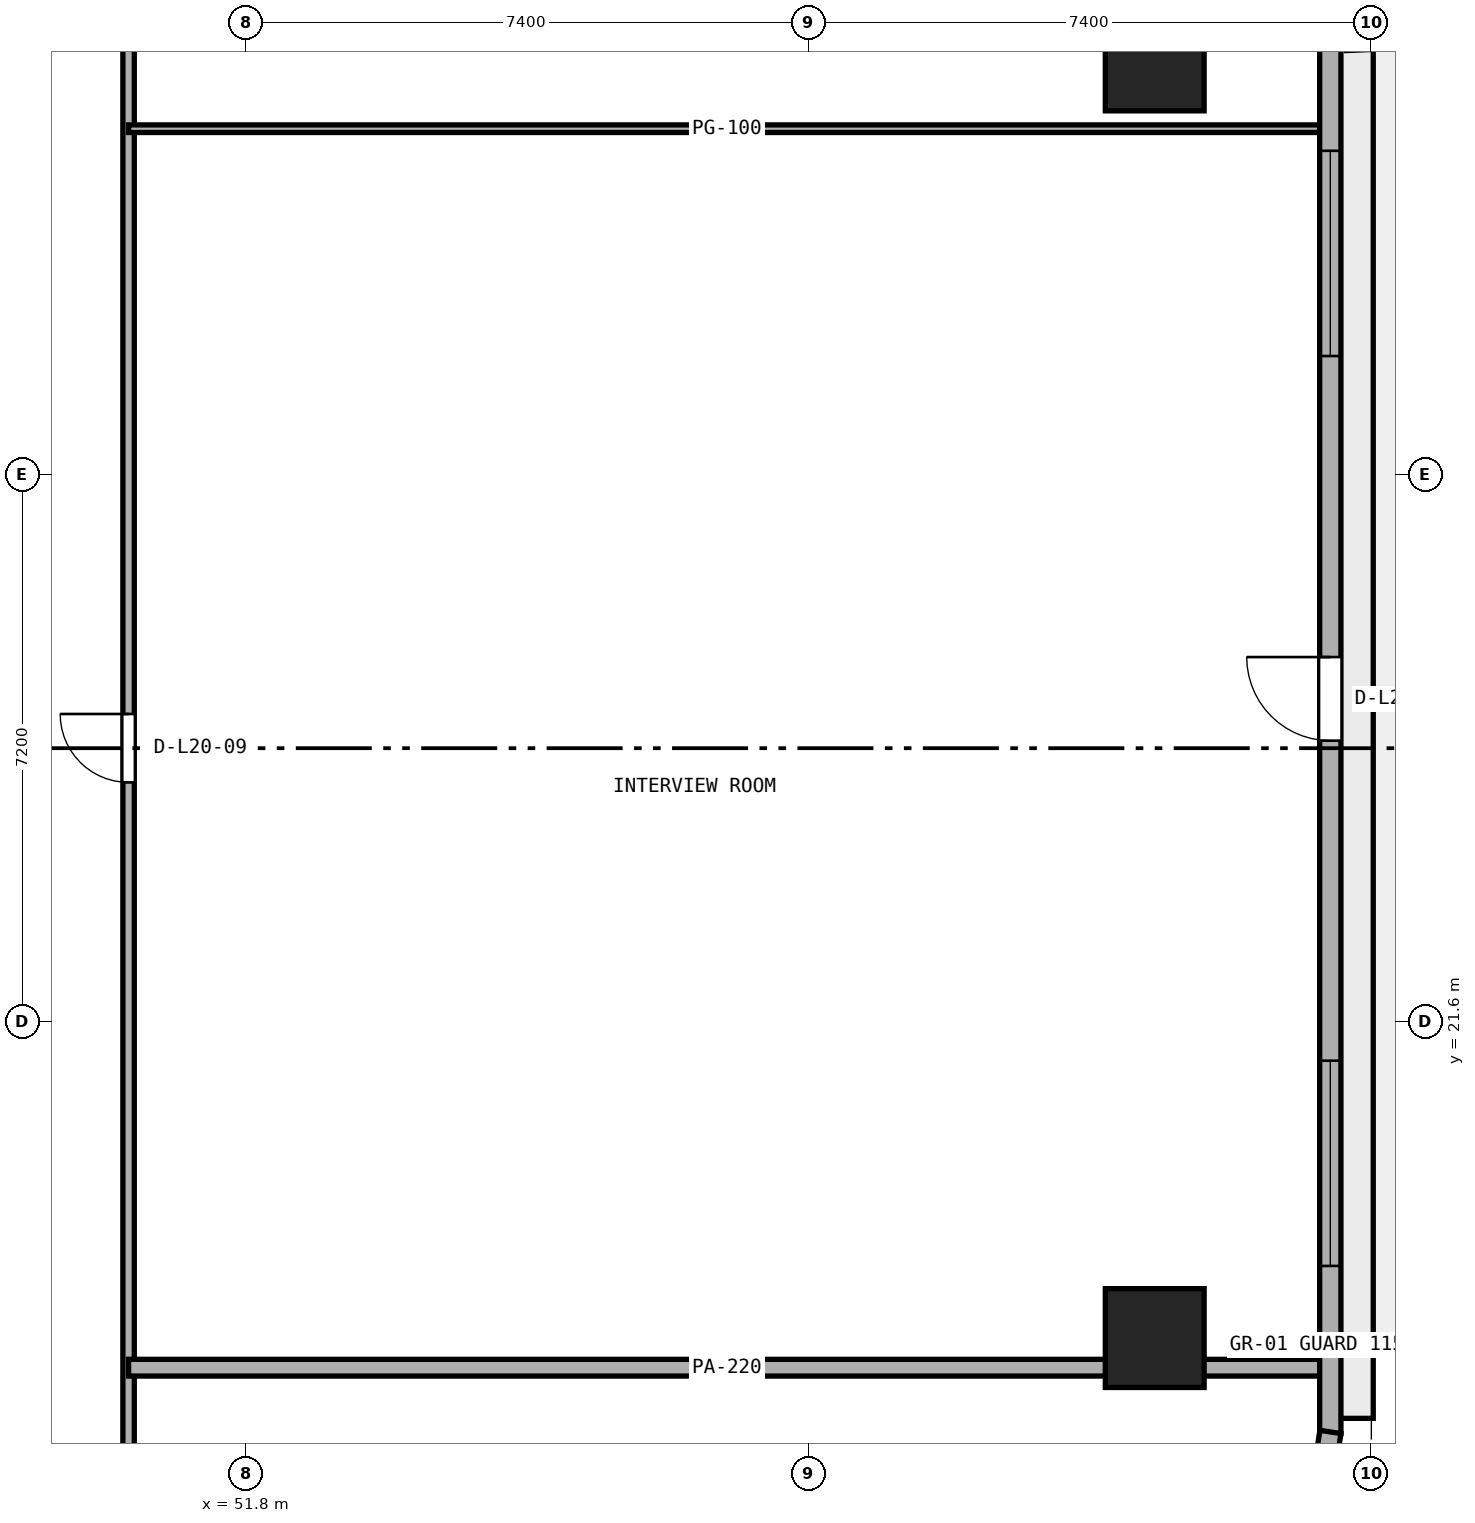
"""IFC4 building model, lengths in metres.
Left out: names, types, materials, properties, quantities, classifications, styles, units other than length and angle.
Written with IfcOpenShell. Run it as: python <this file> out.ifc"""

import sys

from ifc_helpers import new_model, si_unit, direction, frame, frame_2d, origin, origin_2d, place, context, subcontext, project, spatial, rectangle, extrude, element, fill, save


model = new_model("IFC4")
c1 = context("Model", 3, precision=1e-05, world=origin(), true_north=direction((0.0, 1.0)))
c2 = subcontext(c1, "Body", "Model", "MODEL_VIEW")
j1 = project(units=[si_unit("LENGTHUNIT", "METRE"), si_unit("PLANEANGLEUNIT", "RADIAN")], contexts=[c1])
p1 = place(None, origin())
s1 = spatial("IfcSite", under=j1, at=p1, CompositionType="ELEMENT")
p2 = place(p1, origin())
s2 = spatial("IfcBuilding", under=s1, at=p2, CompositionType="ELEMENT")
p3 = place(p2, frame((0.0, 0.0, 82.0)))
s3 = spatial("IfcBuildingStorey", under=s2, at=p3, CompositionType="ELEMENT", Elevation=82.0)
for number, where, z_axis, x_axis in (
    (1, (63.75, 17.44, 0.0), (0.0, 0.0, 1.0), (1.0, 0.0, 0.0)),
    (2, (63.75, 34.235, 0.0), (0.0, 0.0, 1.0), (1.0, 0.0, 0.0)),
):
    element("IfcColumn", number, at=place(p3, frame(where, z_axis=z_axis, x_axis=x_axis)), inside=s3, PredefinedType="COLUMN", context=c2, shape_type="SweptSolid", body=[
        extrude(rectangle(XDim=1.3, YDim=1.3, at=origin_2d()), origin(), (0.0, 0.0, 1.0), 3.8),
    ])
p4 = place(p3, frame((50.25, 15.35, 0.0), z_axis=(0.0, 0.0, 1.0), x_axis=(0.0, 1.0, 0.0)))
e3 = element("IfcWall", 3, at=p4, inside=s3, PredefinedType="PARTITIONING", context=c2, shape_type="SweptSolid", body=[
    extrude(rectangle(XDim=19.7, YDim=0.15, at=frame_2d((9.85, 0.0))), origin(), (0.0, 0.0, 1.0), 3.525),
])
p5 = place(p4, frame((9.4, 0.0, 0.0)))
e4 = element("IfcOpeningElement", 4, at=p5, cuts=e3, PredefinedType="OPENING", context=c2, shape_type="SweptSolid", body=[
    extrude(rectangle(XDim=0.9, YDim=2.1, at=frame_2d((0.45, 1.05))), frame((0.0, 0.085, 0.0), z_axis=(0.0, -1.0, 0.0), x_axis=(1.0, 0.0, 0.0)), (0.0, 0.0, 1.0), 0.17),
])
p6 = place(p3, frame((50.25, 17.05, 0.0), z_axis=(0.0, 0.0, 1.0), x_axis=(1.0, 0.0, 0.0)))
e5 = element("IfcWall", 5, at=p6, inside=s3, PredefinedType="PARTITIONING", context=c2, shape_type="SweptSolid", body=[
    extrude(rectangle(XDim=15.745, YDim=0.22, at=frame_2d((7.873, 0.0))), origin(), (0.0, 0.0, 1.0), 3.525),
])
p7 = place(p3, frame((50.25, 33.35, 0.0), z_axis=(0.0, 0.0, 1.0), x_axis=(1.0, 0.0, 0.0)))
e6 = element("IfcWall", 6, at=p7, inside=s3, PredefinedType="PARTITIONING", context=c2, shape_type="SweptSolid", body=[
    extrude(rectangle(XDim=15.745, YDim=0.1, at=frame_2d((7.873, 0.0))), origin(), (0.0, 0.0, 1.0), 2.908),
])
p8 = place(p3, frame((66.06, 16.183, 0.0), z_axis=(0.0, 0.0, 1.0), x_axis=(0.0, 1.0, 0.0)))
e7 = element("IfcWall", 7, at=p8, inside=s3, PredefinedType="STANDARD", context=c2, shape_type="SweptSolid", body=[
    extrude(rectangle(XDim=19.331, YDim=0.28, at=frame_2d((9.666, 0.0))), origin(), (0.0, 0.0, 1.0), 3.525),
])
p9 = place(p8, frame((9.115, 0.0, 0.0)))
e8 = element("IfcOpeningElement", 8, at=p9, cuts=e7, PredefinedType="OPENING", context=c2, shape_type="SweptSolid", body=[
    extrude(rectangle(XDim=1.1, YDim=2.2, at=frame_2d((0.55, 1.1))), frame((0.0, 0.15, 0.0), z_axis=(0.0, -1.0, 0.0), x_axis=(1.0, 0.0, 0.0)), (0.0, 0.0, 1.0), 0.3),
])
p10 = place(p8, frame((2.205, 0.0, 0.9)))
e9 = element("IfcOpeningElement", 9, at=p10, cuts=e7, PredefinedType="OPENING", context=c2, shape_type="SweptSolid", body=[
    extrude(rectangle(XDim=2.7, YDim=1.75, at=frame_2d((1.35, 0.875))), frame((0.0, 0.15, 0.0), z_axis=(0.0, -1.0, 0.0), x_axis=(1.0, 0.0, 0.0)), (0.0, 0.0, 1.0), 0.3),
])
p11 = place(p8, frame((14.176, 0.0, 0.9)))
e10 = element("IfcOpeningElement", 10, at=p11, cuts=e7, PredefinedType="OPENING", context=c2, shape_type="SweptSolid", body=[
    extrude(rectangle(XDim=2.7, YDim=1.75, at=frame_2d((1.35, 0.875))), frame((0.0, 0.15, 0.0), z_axis=(0.0, -1.0, 0.0), x_axis=(1.0, 0.0, 0.0)), (0.0, 0.0, 1.0), 0.3),
])
p12 = place(p3, frame((65.867, 14.943, 0.0), z_axis=(0.0, 0.0, 1.0), x_axis=(0.152014078361, 0.988378328364, 0.0)))
e11 = element("IfcWall", 11, at=p12, inside=s3, PredefinedType="STANDARD", context=c2, shape_type="SweptSolid", body=[
    extrude(rectangle(XDim=1.277, YDim=0.28, at=frame_2d((0.638, 0.0))), origin(), (0.0, 0.0, 1.0), 3.525),
])
p13 = place(p5, origin())
e12 = element("IfcDoor", 12, at=p13, inside=s3, OperationType="SINGLE_SWING_RIGHT", PredefinedType="DOOR", context=c2, shape_type="SweptSolid", body=[
    extrude(rectangle(XDim=0.9, YDim=2.1, at=frame_2d((0.45, 1.05))), frame((0.0, 0.025, 0.0), z_axis=(0.0, -1.0, 0.0), x_axis=(1.0, 0.0, 0.0)), (0.0, 0.0, 1.0), 0.05),
])
fill(e4, e12)
p14 = place(p9, origin())
e13 = element("IfcDoor", 13, at=p14, inside=s3, OperationType="SINGLE_SWING_RIGHT", PredefinedType="DOOR", context=c2, shape_type="SweptSolid", body=[
    extrude(rectangle(XDim=1.1, YDim=2.2, at=frame_2d((0.55, 1.1))), frame((0.0, 0.025, 0.0), z_axis=(0.0, -1.0, 0.0), x_axis=(1.0, 0.0, 0.0)), (0.0, 0.0, 1.0), 0.05),
])
fill(e8, e13)
p15 = place(p10, origin())
e14 = element("IfcWindow", 14, at=p15, inside=s3, PartitioningType="SINGLE_PANEL", PredefinedType="WINDOW", context=c2, shape_type="SweptSolid", body=[
    extrude(rectangle(XDim=2.7, YDim=1.75, at=frame_2d((1.35, 0.875))), frame((0.0, 0.03, 0.0), z_axis=(0.0, -1.0, 0.0), x_axis=(1.0, 0.0, 0.0)), (0.0, 0.0, 1.0), 0.06),
])
fill(e9, e14)
p16 = place(p11, origin())
e15 = element("IfcWindow", 15, at=p16, inside=s3, PartitioningType="SINGLE_PANEL", PredefinedType="WINDOW", context=c2, shape_type="SweptSolid", body=[
    extrude(rectangle(XDim=2.7, YDim=1.75, at=frame_2d((1.35, 0.875))), frame((0.0, 0.03, 0.0), z_axis=(0.0, -1.0, 0.0), x_axis=(1.0, 0.0, 0.0)), (0.0, 0.0, 1.0), 0.06),
])
fill(e10, e15)
save(model, sys.argv[1])
